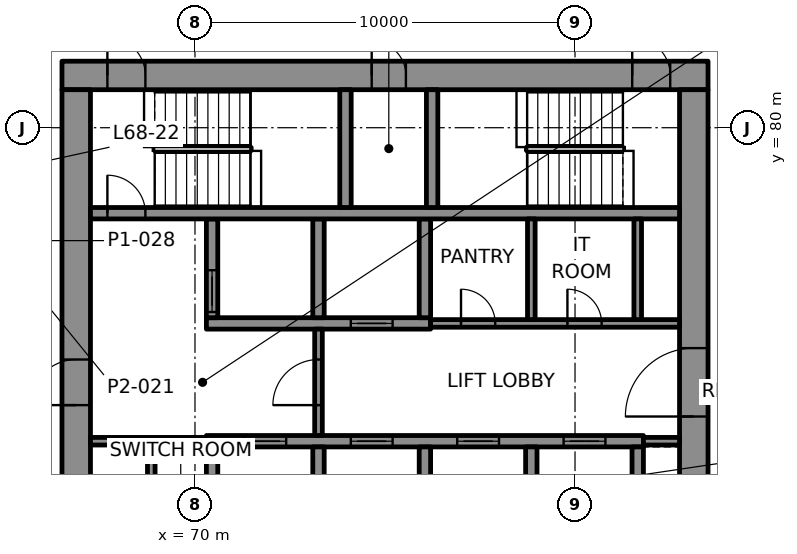
"""IFC4 building model, lengths in metres.
Left out: names, types, materials, properties, quantities, classifications, styles, units other than length and angle.
Written with IfcOpenShell. Run it as: python <this file> out.ifc"""

import sys

from ifc_helpers import new_model, si_unit, direction, frame, frame_2d, origin, place, context, subcontext, project, spatial, rectangle, extrude, element, fill, save


model = new_model("IFC4")
c1 = context("Model", 3, precision=1e-05, world=origin(), true_north=direction((0.0, 1.0)))
c2 = subcontext(c1, "Body", "Model", "MODEL_VIEW")
j1 = project(units=[si_unit("LENGTHUNIT", "METRE"), si_unit("PLANEANGLEUNIT", "RADIAN")], contexts=[c1])
p1 = place(None, origin())
s1 = spatial("IfcSite", under=j1, at=p1, CompositionType="ELEMENT")
p2 = place(p1, origin())
s2 = spatial("IfcBuilding", under=s1, at=p2, CompositionType="ELEMENT")
p3 = place(p2, frame((0.0, 0.0, 284.6)))
s3 = spatial("IfcBuildingStorey", under=s2, at=p3, CompositionType="ELEMENT", Elevation=284.6)
p4 = place(p3, frame((66.5, 81.375, 0.0), z_axis=(0.0, 0.0, 1.0), x_axis=(1.0, 0.0, 0.0)))
e1 = element("IfcWall", 1, at=p4, inside=s3, PredefinedType="SHEAR", context=c2, shape_type="SweptSolid", body=[
    extrude(rectangle(XDim=17.0, YDim=0.75, at=frame_2d((8.5, 0.0))), origin(), (0.0, 0.0, 1.0), 3.3),
])
p5 = place(p4, frame((1.195, 0.0, 0.0)))
e2 = element("IfcOpeningElement", 2, at=p5, cuts=e1, PredefinedType="OPENING", context=c2, shape_type="SweptSolid", body=[
    extrude(rectangle(XDim=1.0, YDim=2.1, at=frame_2d((0.5, 1.05))), frame((0.0, 0.385, 0.0), z_axis=(0.0, -1.0, 0.0), x_axis=(1.0, 0.0, 0.0)), (0.0, 0.0, 1.0), 0.77),
])
p6 = place(p4, frame((15.005, 0.0, 0.0)))
e3 = element("IfcOpeningElement", 3, at=p6, cuts=e1, PredefinedType="OPENING", context=c2, shape_type="SweptSolid", body=[
    extrude(rectangle(XDim=1.0, YDim=2.1, at=frame_2d((0.5, 1.05))), frame((0.0, 0.385, 0.0), z_axis=(0.0, -1.0, 0.0), x_axis=(1.0, 0.0, 0.0)), (0.0, 0.0, 1.0), 0.77),
])
p7 = place(p4, frame((8.15, 0.0, 0.0)))
e4 = element("IfcOpeningElement", 4, at=p7, cuts=e1, PredefinedType="OPENING", context=c2, shape_type="SweptSolid", body=[
    extrude(rectangle(XDim=0.9, YDim=2.1, at=frame_2d((0.45, 1.05))), frame((0.0, 0.385, 0.0), z_axis=(0.0, -1.0, 0.0), x_axis=(1.0, 0.0, 0.0)), (0.0, 0.0, 1.0), 0.77),
])
p8 = place(p3, frame((66.875, 69.0, 0.0), z_axis=(0.0, 0.0, 1.0), x_axis=(0.0, 1.0, 0.0)))
e5 = element("IfcWall", 5, at=p8, inside=s3, PredefinedType="SHEAR", context=c2, shape_type="SweptSolid", body=[
    extrude(rectangle(XDim=12.0, YDim=0.75, at=frame_2d((6.0, 0.0))), origin(), (0.0, 0.0, 1.0), 3.3),
])
p9 = place(p8, frame((3.7, 0.0, 0.0)))
e6 = element("IfcOpeningElement", 6, at=p9, cuts=e5, PredefinedType="OPENING", context=c2, shape_type="SweptSolid", body=[
    extrude(rectangle(XDim=1.2, YDim=2.1, at=frame_2d((0.6, 1.05))), frame((0.0, 0.385, 0.0), z_axis=(0.0, -1.0, 0.0), x_axis=(1.0, 0.0, 0.0)), (0.0, 0.0, 1.0), 0.77),
])
p10 = place(p8, frame((0.925, 0.0, 0.0)))
e7 = element("IfcOpeningElement", 7, at=p10, cuts=e5, PredefinedType="OPENING", context=c2, shape_type="SweptSolid", body=[
    extrude(rectangle(XDim=0.9, YDim=2.1, at=frame_2d((0.45, 1.05))), frame((0.0, 0.385, 0.0), z_axis=(0.0, -1.0, 0.0), x_axis=(1.0, 0.0, 0.0)), (0.0, 0.0, 1.0), 0.77),
])
p11 = place(p3, frame((83.125, 69.0, 0.0), z_axis=(0.0, 0.0, 1.0), x_axis=(0.0, 1.0, 0.0)))
e8 = element("IfcWall", 8, at=p11, inside=s3, PredefinedType="SHEAR", context=c2, shape_type="SweptSolid", body=[
    extrude(rectangle(XDim=12.0, YDim=0.75, at=frame_2d((6.0, 0.0))), origin(), (0.0, 0.0, 1.0), 3.3),
])
p12 = place(p11, frame((3.4, 0.0, 0.0)))
e9 = element("IfcOpeningElement", 9, at=p12, cuts=e8, PredefinedType="OPENING", context=c2, shape_type="SweptSolid", body=[
    extrude(rectangle(XDim=1.8, YDim=2.1, at=frame_2d((0.9, 1.05))), frame((0.0, 0.385, 0.0), z_axis=(0.0, -1.0, 0.0), x_axis=(1.0, 0.0, 0.0)), (0.0, 0.0, 1.0), 0.77),
])
p13 = place(p3, frame((70.3, 71.75, 0.0), z_axis=(0.0, 0.0, 1.0), x_axis=(1.0, 0.0, 0.0)))
e10 = element("IfcWall", 10, at=p13, inside=s3, PredefinedType="SHEAR", context=c2, shape_type="SweptSolid", body=[
    extrude(rectangle(XDim=11.5, YDim=0.3, at=frame_2d((5.75, 0.0))), origin(), (0.0, 0.0, 1.0), 3.3),
])
p14 = place(p13, frame((1.0, 0.0, 0.0)))
e11 = element("IfcOpeningElement", 11, at=p14, cuts=e10, PredefinedType="OPENING", context=c2, shape_type="SweptSolid", body=[
    extrude(rectangle(XDim=1.1, YDim=2.1, at=frame_2d((0.55, 1.05))), frame((0.0, 0.16, 0.0), z_axis=(0.0, -1.0, 0.0), x_axis=(1.0, 0.0, 0.0)), (0.0, 0.0, 1.0), 0.32),
])
p15 = place(p13, frame((3.8, 0.0, 0.0)))
e12 = element("IfcOpeningElement", 12, at=p15, cuts=e10, PredefinedType="OPENING", context=c2, shape_type="SweptSolid", body=[
    extrude(rectangle(XDim=1.1, YDim=2.1, at=frame_2d((0.55, 1.05))), frame((0.0, 0.16, 0.0), z_axis=(0.0, -1.0, 0.0), x_axis=(1.0, 0.0, 0.0)), (0.0, 0.0, 1.0), 0.32),
])
p16 = place(p13, frame((6.6, 0.0, 0.0)))
e13 = element("IfcOpeningElement", 13, at=p16, cuts=e10, PredefinedType="OPENING", context=c2, shape_type="SweptSolid", body=[
    extrude(rectangle(XDim=1.1, YDim=2.1, at=frame_2d((0.55, 1.05))), frame((0.0, 0.16, 0.0), z_axis=(0.0, -1.0, 0.0), x_axis=(1.0, 0.0, 0.0)), (0.0, 0.0, 1.0), 0.32),
])
p17 = place(p13, frame((9.4, 0.0, 0.0)))
e14 = element("IfcOpeningElement", 14, at=p17, cuts=e10, PredefinedType="OPENING", context=c2, shape_type="SweptSolid", body=[
    extrude(rectangle(XDim=1.1, YDim=2.1, at=frame_2d((0.55, 1.05))), frame((0.0, 0.16, 0.0), z_axis=(0.0, -1.0, 0.0), x_axis=(1.0, 0.0, 0.0)), (0.0, 0.0, 1.0), 0.32),
])
p18 = place(p3, frame((70.3, 74.85, 0.0), z_axis=(0.0, 0.0, 1.0), x_axis=(1.0, 0.0, 0.0)))
e15 = element("IfcWall", 15, at=p18, inside=s3, PredefinedType="SHEAR", context=c2, shape_type="SweptSolid", body=[
    extrude(rectangle(XDim=5.9, YDim=0.3, at=frame_2d((2.95, 0.0))), origin(), (0.0, 0.0, 1.0), 3.3),
])
p19 = place(p18, frame((3.8, 0.0, 0.0)))
e16 = element("IfcOpeningElement", 16, at=p19, cuts=e15, PredefinedType="OPENING", context=c2, shape_type="SweptSolid", body=[
    extrude(rectangle(XDim=1.1, YDim=2.1, at=frame_2d((0.55, 1.05))), frame((0.0, 0.16, 0.0), z_axis=(0.0, -1.0, 0.0), x_axis=(1.0, 0.0, 0.0)), (0.0, 0.0, 1.0), 0.32),
])
p20 = place(p3, frame((70.45, 69.0, 0.0), z_axis=(0.0, 0.0, 1.0), x_axis=(0.0, 1.0, 0.0)))
e17 = element("IfcWall", 17, at=p20, inside=s3, PredefinedType="SHEAR", context=c2, shape_type="SweptSolid", body=[
    extrude(rectangle(XDim=2.6, YDim=0.3, at=frame_2d((1.3, 0.0))), origin(), (0.0, 0.0, 1.0), 3.3),
])
p21 = place(p3, frame((70.45, 75.0, 0.0), z_axis=(0.0, 0.0, 1.0), x_axis=(0.0, 1.0, 0.0)))
e18 = element("IfcWall", 18, at=p21, inside=s3, PredefinedType="SHEAR", context=c2, shape_type="SweptSolid", body=[
    extrude(rectangle(XDim=2.6, YDim=0.3, at=frame_2d((1.3, 0.0))), origin(), (0.0, 0.0, 1.0), 3.3),
])
p22 = place(p21, frame((0.15, 0.0, 0.0)))
e19 = element("IfcOpeningElement", 19, at=p22, cuts=e18, PredefinedType="OPENING", context=c2, shape_type="SweptSolid", body=[
    extrude(rectangle(XDim=1.1, YDim=2.1, at=frame_2d((0.55, 1.05))), frame((0.0, 0.16, 0.0), z_axis=(0.0, -1.0, 0.0), x_axis=(1.0, 0.0, 0.0)), (0.0, 0.0, 1.0), 0.32),
])
for number, where, z_axis, x_axis in (
    (20, (73.25, 69.0, 0.0), (0.0, 0.0, 1.0), (0.0, 1.0, 0.0)),
    (21, (73.25, 75.0, 0.0), (0.0, 0.0, 1.0), (0.0, 1.0, 0.0)),
    (22, (76.05, 69.0, 0.0), (0.0, 0.0, 1.0), (0.0, 1.0, 0.0)),
    (23, (76.05, 75.0, 0.0), (0.0, 0.0, 1.0), (0.0, 1.0, 0.0)),
    (24, (78.85, 69.0, 0.0), (0.0, 0.0, 1.0), (0.0, 1.0, 0.0)),
    (25, (81.65, 69.0, 0.0), (0.0, 0.0, 1.0), (0.0, 1.0, 0.0)),
):
    element("IfcWall", number, at=place(p3, frame(where, z_axis=z_axis, x_axis=x_axis)), inside=s3, PredefinedType="SHEAR", context=c2, shape_type="SweptSolid", body=[
        extrude(rectangle(XDim=2.6, YDim=0.3, at=frame_2d((1.3, 0.0))), origin(), (0.0, 0.0, 1.0), 3.3),
    ])
p23 = place(p3, frame((67.25, 77.75, 0.0), z_axis=(0.0, 0.0, 1.0), x_axis=(1.0, 0.0, 0.0)))
e26 = element("IfcWall", 26, at=p23, inside=s3, PredefinedType="SHEAR", context=c2, shape_type="SweptSolid", body=[
    extrude(rectangle(XDim=15.5, YDim=0.3, at=frame_2d((7.75, 0.0))), origin(), (0.0, 0.0, 1.0), 3.3),
])
p24 = place(p23, frame((0.445, 0.0, 0.0)))
e27 = element("IfcOpeningElement", 27, at=p24, cuts=e26, PredefinedType="OPENING", context=c2, shape_type="SweptSolid", body=[
    extrude(rectangle(XDim=1.0, YDim=2.1, at=frame_2d((0.5, 1.05))), frame((0.0, 0.16, 0.0), z_axis=(0.0, -1.0, 0.0), x_axis=(1.0, 0.0, 0.0)), (0.0, 0.0, 1.0), 0.32),
])
for number, where, z_axis, x_axis in (
    (28, (73.96, 77.9, 0.0), (0.0, 0.0, 1.0), (0.0, 1.0, 0.0)),
    (29, (76.24, 77.9, 0.0), (0.0, 0.0, 1.0), (0.0, 1.0, 0.0)),
):
    element("IfcWall", number, at=place(p3, frame(where, z_axis=z_axis, x_axis=x_axis)), inside=s3, PredefinedType="SHEAR", context=c2, shape_type="SweptSolid", body=[
        extrude(rectangle(XDim=3.1, YDim=0.3, at=frame_2d((1.55, 0.0))), origin(), (0.0, 0.0, 1.0), 3.3),
    ])
p25 = place(p3, frame((67.25, 71.75, 0.0), z_axis=(0.0, 0.0, 1.0), x_axis=(1.0, 0.0, 0.0)))
e30 = element("IfcWall", 30, at=p25, inside=s3, PredefinedType="PARTITIONING", context=c2, shape_type="SweptSolid", body=[
    extrude(rectangle(XDim=3.05, YDim=0.2, at=frame_2d((1.525, 0.0))), origin(), (0.0, 0.0, 1.0), 3.3),
])
p26 = place(p3, frame((81.8, 71.75, 0.0), z_axis=(0.0, 0.0, 1.0), x_axis=(1.0, 0.0, 0.0)))
e31 = element("IfcWall", 31, at=p26, inside=s3, PredefinedType="PARTITIONING", context=c2, shape_type="SweptSolid", body=[
    extrude(rectangle(XDim=0.95, YDim=0.2, at=frame_2d((0.475, 0.0))), origin(), (0.0, 0.0, 1.0), 3.3),
])
p27 = place(p3, frame((76.2, 74.85, 0.0), z_axis=(0.0, 0.0, 1.0), x_axis=(1.0, 0.0, 0.0)))
e32 = element("IfcWall", 32, at=p27, inside=s3, PredefinedType="PARTITIONING", context=c2, shape_type="SweptSolid", body=[
    extrude(rectangle(XDim=6.55, YDim=0.2, at=frame_2d((3.275, 0.0))), origin(), (0.0, 0.0, 1.0), 3.3),
])
p28 = place(p27, frame((0.8, 0.0, 0.0)))
e33 = element("IfcOpeningElement", 33, at=p28, cuts=e32, PredefinedType="OPENING", context=c2, shape_type="SweptSolid", body=[
    extrude(rectangle(XDim=0.9, YDim=2.1, at=frame_2d((0.45, 1.05))), frame((0.0, 0.11, 0.0), z_axis=(0.0, -1.0, 0.0), x_axis=(1.0, 0.0, 0.0)), (0.0, 0.0, 1.0), 0.22),
])
p29 = place(p27, frame((3.6, 0.0, 0.0)))
e34 = element("IfcOpeningElement", 34, at=p29, cuts=e32, PredefinedType="OPENING", context=c2, shape_type="SweptSolid", body=[
    extrude(rectangle(XDim=0.9, YDim=2.1, at=frame_2d((0.45, 1.05))), frame((0.0, 0.11, 0.0), z_axis=(0.0, -1.0, 0.0), x_axis=(1.0, 0.0, 0.0)), (0.0, 0.0, 1.0), 0.22),
])
p30 = place(p3, frame((68.85, 69.0, 0.0), z_axis=(0.0, 0.0, 1.0), x_axis=(0.0, 1.0, 0.0)))
e35 = element("IfcWall", 35, at=p30, inside=s3, PredefinedType="PARTITIONING", context=c2, shape_type="SweptSolid", body=[
    extrude(rectangle(XDim=2.65, YDim=0.2, at=frame_2d((1.325, 0.0))), origin(), (0.0, 0.0, 1.0), 3.3),
])
p31 = place(p3, frame((73.25, 71.9, 0.0), z_axis=(0.0, 0.0, 1.0), x_axis=(0.0, 1.0, 0.0)))
e36 = element("IfcWall", 36, at=p31, inside=s3, PredefinedType="PARTITIONING", context=c2, shape_type="SweptSolid", body=[
    extrude(rectangle(XDim=2.8, YDim=0.2, at=frame_2d((1.4, 0.0))), origin(), (0.0, 0.0, 1.0), 3.3),
])
p32 = place(p31, frame((0.8, 0.0, 0.0)))
e37 = element("IfcOpeningElement", 37, at=p32, cuts=e36, PredefinedType="OPENING", context=c2, shape_type="SweptSolid", body=[
    extrude(rectangle(XDim=1.2, YDim=2.1, at=frame_2d((0.6, 1.05))), frame((0.0, 0.11, 0.0), z_axis=(0.0, -1.0, 0.0), x_axis=(1.0, 0.0, 0.0)), (0.0, 0.0, 1.0), 0.22),
])
for number, where, z_axis, x_axis in (
    (38, (78.85, 74.95, 0.0), (0.0, 0.0, 1.0), (0.0, 1.0, 0.0)),
    (39, (81.65, 74.95, 0.0), (0.0, 0.0, 1.0), (0.0, 1.0, 0.0)),
):
    element("IfcWall", number, at=place(p3, frame(where, z_axis=z_axis, x_axis=x_axis)), inside=s3, PredefinedType="PARTITIONING", context=c2, shape_type="SweptSolid", body=[
        extrude(rectangle(XDim=2.65, YDim=0.2, at=frame_2d((1.325, 0.0))), origin(), (0.0, 0.0, 1.0), 3.3),
    ])
p33 = place(p14, origin())
e40 = element("IfcDoor", 40, at=p33, inside=s3, OperationType="DOUBLE_DOOR_SLIDING", PredefinedType="DOOR", context=c2, shape_type="SweptSolid", body=[
    extrude(rectangle(XDim=1.1, YDim=2.1, at=frame_2d((0.55, 1.05))), frame((0.0, 0.025, 0.0), z_axis=(0.0, -1.0, 0.0), x_axis=(1.0, 0.0, 0.0)), (0.0, 0.0, 1.0), 0.05),
])
fill(e11, e40)
p34 = place(p15, origin())
e41 = element("IfcDoor", 41, at=p34, inside=s3, OperationType="DOUBLE_DOOR_SLIDING", PredefinedType="DOOR", context=c2, shape_type="SweptSolid", body=[
    extrude(rectangle(XDim=1.1, YDim=2.1, at=frame_2d((0.55, 1.05))), frame((0.0, 0.025, 0.0), z_axis=(0.0, -1.0, 0.0), x_axis=(1.0, 0.0, 0.0)), (0.0, 0.0, 1.0), 0.05),
])
fill(e12, e41)
p35 = place(p16, origin())
e42 = element("IfcDoor", 42, at=p35, inside=s3, OperationType="DOUBLE_DOOR_SLIDING", PredefinedType="DOOR", context=c2, shape_type="SweptSolid", body=[
    extrude(rectangle(XDim=1.1, YDim=2.1, at=frame_2d((0.55, 1.05))), frame((0.0, 0.025, 0.0), z_axis=(0.0, -1.0, 0.0), x_axis=(1.0, 0.0, 0.0)), (0.0, 0.0, 1.0), 0.05),
])
fill(e13, e42)
p36 = place(p17, origin())
e43 = element("IfcDoor", 43, at=p36, inside=s3, OperationType="DOUBLE_DOOR_SLIDING", PredefinedType="DOOR", context=c2, shape_type="SweptSolid", body=[
    extrude(rectangle(XDim=1.1, YDim=2.1, at=frame_2d((0.55, 1.05))), frame((0.0, 0.025, 0.0), z_axis=(0.0, -1.0, 0.0), x_axis=(1.0, 0.0, 0.0)), (0.0, 0.0, 1.0), 0.05),
])
fill(e14, e43)
p37 = place(p22, origin())
e44 = element("IfcDoor", 44, at=p37, inside=s3, OperationType="DOUBLE_DOOR_SLIDING", PredefinedType="DOOR", context=c2, shape_type="SweptSolid", body=[
    extrude(rectangle(XDim=1.1, YDim=2.1, at=frame_2d((0.55, 1.05))), frame((0.0, 0.025, 0.0), z_axis=(0.0, -1.0, 0.0), x_axis=(1.0, 0.0, 0.0)), (0.0, 0.0, 1.0), 0.05),
])
fill(e19, e44)
p38 = place(p19, origin())
e45 = element("IfcDoor", 45, at=p38, inside=s3, OperationType="DOUBLE_DOOR_SLIDING", PredefinedType="DOOR", context=c2, shape_type="SweptSolid", body=[
    extrude(rectangle(XDim=1.1, YDim=2.1, at=frame_2d((0.55, 1.05))), frame((0.0, 0.025, 0.0), z_axis=(0.0, -1.0, 0.0), x_axis=(1.0, 0.0, 0.0)), (0.0, 0.0, 1.0), 0.05),
])
fill(e16, e45)
p39 = place(p24, origin())
e46 = element("IfcDoor", 46, at=p39, inside=s3, OperationType="SINGLE_SWING_LEFT", PredefinedType="DOOR", context=c2, shape_type="SweptSolid", body=[
    extrude(rectangle(XDim=1.0, YDim=2.1, at=frame_2d((0.5, 1.05))), frame((0.0, 0.025, 0.0), z_axis=(0.0, -1.0, 0.0), x_axis=(1.0, 0.0, 0.0)), (0.0, 0.0, 1.0), 0.05),
])
fill(e27, e46)
p40 = place(p5, origin())
e47 = element("IfcDoor", 47, at=p40, inside=s3, OperationType="SINGLE_SWING_RIGHT", PredefinedType="DOOR", context=c2, shape_type="SweptSolid", body=[
    extrude(rectangle(XDim=1.0, YDim=2.1, at=frame_2d((0.5, 1.05))), frame((0.0, 0.095, 0.0), z_axis=(0.0, -1.0, 0.0), x_axis=(1.0, 0.0, 0.0)), (0.0, 0.0, 1.0), 0.19),
])
fill(e2, e47)
p41 = place(p6, origin())
e48 = element("IfcDoor", 48, at=p41, inside=s3, OperationType="SINGLE_SWING_LEFT", PredefinedType="DOOR", context=c2, shape_type="SweptSolid", body=[
    extrude(rectangle(XDim=1.0, YDim=2.1, at=frame_2d((0.5, 1.05))), frame((0.0, 0.095, 0.0), z_axis=(0.0, -1.0, 0.0), x_axis=(1.0, 0.0, 0.0)), (0.0, 0.0, 1.0), 0.19),
])
fill(e3, e48)
p42 = place(p32, origin())
e49 = element("IfcDoor", 49, at=p42, inside=s3, OperationType="SINGLE_SWING_LEFT", PredefinedType="DOOR", context=c2, shape_type="SweptSolid", body=[
    extrude(rectangle(XDim=1.2, YDim=2.1, at=frame_2d((0.6, 1.05))), frame((0.0, 0.025, 0.0), z_axis=(0.0, -1.0, 0.0), x_axis=(1.0, 0.0, 0.0)), (0.0, 0.0, 1.0), 0.05),
])
fill(e37, e49)
p43 = place(p9, origin())
e50 = element("IfcDoor", 50, at=p43, inside=s3, OperationType="SINGLE_SWING_RIGHT", PredefinedType="DOOR", context=c2, shape_type="SweptSolid", body=[
    extrude(rectangle(XDim=1.2, YDim=2.1, at=frame_2d((0.6, 1.05))), frame((0.0, 0.095, 0.0), z_axis=(0.0, -1.0, 0.0), x_axis=(1.0, 0.0, 0.0)), (0.0, 0.0, 1.0), 0.19),
])
fill(e6, e50)
p44 = place(p12, origin())
e51 = element("IfcDoor", 51, at=p44, inside=s3, OperationType="SINGLE_SWING_LEFT", PredefinedType="DOOR", context=c2, shape_type="SweptSolid", body=[
    extrude(rectangle(XDim=1.8, YDim=2.1, at=frame_2d((0.9, 1.05))), frame((0.0, 0.095, 0.0), z_axis=(0.0, -1.0, 0.0), x_axis=(1.0, 0.0, 0.0)), (0.0, 0.0, 1.0), 0.19),
])
fill(e9, e51)
p45 = place(p28, origin())
e52 = element("IfcDoor", 52, at=p45, inside=s3, OperationType="SINGLE_SWING_RIGHT", PredefinedType="DOOR", context=c2, shape_type="SweptSolid", body=[
    extrude(rectangle(XDim=0.9, YDim=2.1, at=frame_2d((0.45, 1.05))), frame((0.0, 0.025, 0.0), z_axis=(0.0, -1.0, 0.0), x_axis=(1.0, 0.0, 0.0)), (0.0, 0.0, 1.0), 0.05),
])
fill(e33, e52)
p46 = place(p29, origin())
e53 = element("IfcDoor", 53, at=p46, inside=s3, OperationType="SINGLE_SWING_LEFT", PredefinedType="DOOR", context=c2, shape_type="SweptSolid", body=[
    extrude(rectangle(XDim=0.9, YDim=2.1, at=frame_2d((0.45, 1.05))), frame((0.0, 0.025, 0.0), z_axis=(0.0, -1.0, 0.0), x_axis=(1.0, 0.0, 0.0)), (0.0, 0.0, 1.0), 0.05),
])
fill(e34, e53)
p47 = place(p7, origin())
e54 = element("IfcDoor", 54, at=p47, inside=s3, OperationType="SINGLE_SWING_RIGHT", PredefinedType="DOOR", context=c2, shape_type="SweptSolid", body=[
    extrude(rectangle(XDim=0.9, YDim=2.1, at=frame_2d((0.45, 1.05))), frame((0.0, 0.095, 0.0), z_axis=(0.0, -1.0, 0.0), x_axis=(1.0, 0.0, 0.0)), (0.0, 0.0, 1.0), 0.19),
])
fill(e4, e54)
save(model, sys.argv[1])
